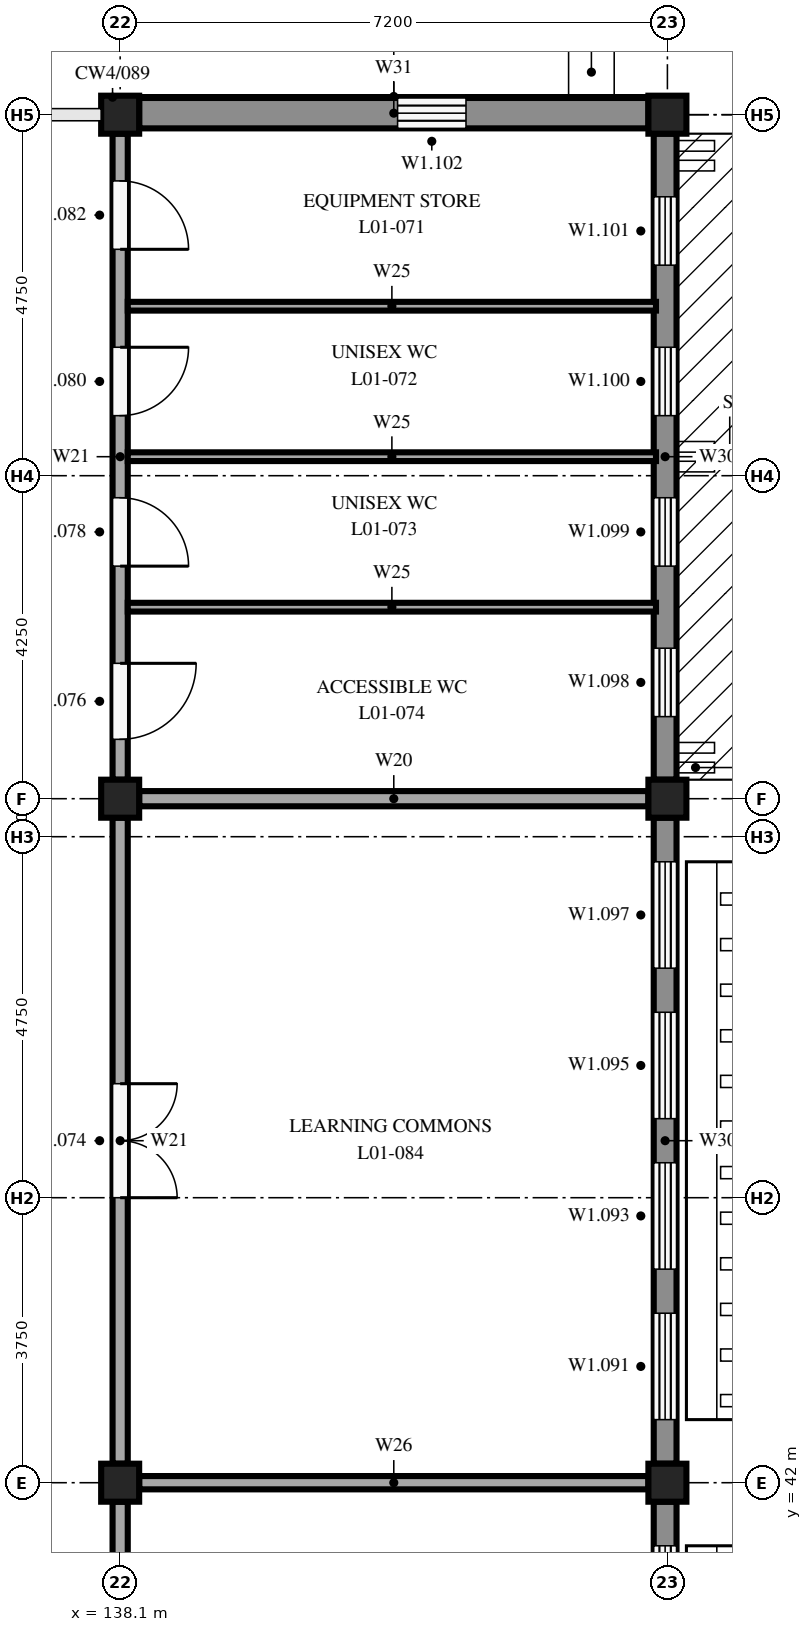
"""IFC4 building model, lengths in metres.
Left out: names, types, materials, properties, quantities, classifications, styles, units other than length and angle.
Written with IfcOpenShell. Run it as: python <this file> out.ifc"""

import sys

from ifc_helpers import new_model, si_unit, direction, frame, frame_2d, origin, origin_2d, place, context, subcontext, project, spatial, rectangle, extrude, element, fill, save


model = new_model("IFC4")
c1 = context("Model", 3, precision=1e-05, world=origin(), true_north=direction((0.0, 1.0)))
c2 = subcontext(c1, "Body", "Model", "MODEL_VIEW")
j1 = project(units=[si_unit("LENGTHUNIT", "METRE"), si_unit("PLANEANGLEUNIT", "RADIAN")], contexts=[c1])
p1 = place(None, origin())
s1 = spatial("IfcSite", under=j1, at=p1, CompositionType="ELEMENT")
p2 = place(p1, origin())
s2 = spatial("IfcBuilding", under=s1, at=p2, CompositionType="ELEMENT")
p3 = place(p2, frame((0.0, 0.0, 4.5)))
s3 = spatial("IfcBuildingStorey", under=s2, at=p3, CompositionType="ELEMENT", Elevation=4.5)
for number, where, z_axis, x_axis in (
    (1, (138.1, 42.0, 0.0), (0.0, 0.0, 1.0), (1.0, 0.0, 0.0)),
    (2, (138.1, 51.0, 0.0), (0.0, 0.0, 1.0), (1.0, 0.0, 0.0)),
    (3, (138.1, 60.0, 0.0), (0.0, 0.0, 1.0), (1.0, 0.0, 0.0)),
    (4, (145.3, 42.0, 0.0), (0.0, 0.0, 1.0), (1.0, 0.0, 0.0)),
    (5, (145.3, 51.0, 0.0), (0.0, 0.0, 1.0), (1.0, 0.0, 0.0)),
    (6, (145.3, 60.0, 0.0), (0.0, 0.0, 1.0), (1.0, 0.0, 0.0)),
):
    element("IfcColumn", number, at=place(p3, frame(where, z_axis=z_axis, x_axis=x_axis)), inside=s3, PredefinedType="COLUMN", context=c2, shape_type="SweptSolid", body=[
        extrude(rectangle(XDim=0.5, YDim=0.5, at=origin_2d()), origin(), (0.0, 0.0, 1.0), 3.35),
    ])
p4 = place(p3, frame((145.27, 41.75, 0.0), z_axis=(0.0, 0.0, 1.0), x_axis=(0.0, -1.0, 0.0)))
e7 = element("IfcWall", 7, at=p4, inside=s3, PredefinedType="STANDARD", context=c2, shape_type="SweptSolid", body=[
    extrude(rectangle(XDim=8.5, YDim=0.3, at=frame_2d((4.25, 0.0))), origin(), (0.0, 0.0, 1.0), 2.85),
])
p5 = place(p4, frame((6.52, 0.0, 0.6)))
e8 = element("IfcOpeningElement", 8, at=p5, cuts=e7, PredefinedType="OPENING", context=c2, shape_type="SweptSolid", body=[
    extrude(rectangle(XDim=1.4, YDim=2.2, at=frame_2d((0.7, 1.1))), frame((0.0, 0.16, 0.0), z_axis=(0.0, -1.0, 0.0), x_axis=(1.0, 0.0, 0.0)), (0.0, 0.0, 1.0), 0.32),
])
p6 = place(p4, frame((4.54, 0.0, 0.6)))
e9 = element("IfcOpeningElement", 9, at=p6, cuts=e7, PredefinedType="OPENING", context=c2, shape_type="SweptSolid", body=[
    extrude(rectangle(XDim=1.4, YDim=2.2, at=frame_2d((0.7, 1.1))), frame((0.0, 0.16, 0.0), z_axis=(0.0, -1.0, 0.0), x_axis=(1.0, 0.0, 0.0)), (0.0, 0.0, 1.0), 0.32),
])
p7 = place(p4, frame((2.56, 0.0, 0.6)))
e10 = element("IfcOpeningElement", 10, at=p7, cuts=e7, PredefinedType="OPENING", context=c2, shape_type="SweptSolid", body=[
    extrude(rectangle(XDim=1.4, YDim=2.2, at=frame_2d((0.7, 1.1))), frame((0.0, 0.16, 0.0), z_axis=(0.0, -1.0, 0.0), x_axis=(1.0, 0.0, 0.0)), (0.0, 0.0, 1.0), 0.32),
])
p8 = place(p4, frame((0.58, 0.0, 0.6)))
e11 = element("IfcOpeningElement", 11, at=p8, cuts=e7, PredefinedType="OPENING", context=c2, shape_type="SweptSolid", body=[
    extrude(rectangle(XDim=1.4, YDim=2.2, at=frame_2d((0.7, 1.1))), frame((0.0, 0.16, 0.0), z_axis=(0.0, -1.0, 0.0), x_axis=(1.0, 0.0, 0.0)), (0.0, 0.0, 1.0), 0.32),
])
p9 = place(p3, frame((145.27, 50.75, 0.0), z_axis=(0.0, 0.0, 1.0), x_axis=(0.0, -1.0, 0.0)))
e12 = element("IfcWall", 12, at=p9, inside=s3, PredefinedType="STANDARD", context=c2, shape_type="SweptSolid", body=[
    extrude(rectangle(XDim=8.5, YDim=0.3, at=frame_2d((4.25, 0.0))), origin(), (0.0, 0.0, 1.0), 2.85),
])
p10 = place(p9, frame((6.52, 0.0, 0.3)))
e13 = element("IfcOpeningElement", 13, at=p10, cuts=e12, PredefinedType="OPENING", context=c2, shape_type="SweptSolid", body=[
    extrude(rectangle(XDim=1.4, YDim=2.5, at=frame_2d((0.7, 1.25))), frame((0.0, 0.16, 0.0), z_axis=(0.0, -1.0, 0.0), x_axis=(1.0, 0.0, 0.0)), (0.0, 0.0, 1.0), 0.32),
])
p11 = place(p9, frame((4.54, 0.0, 0.3)))
e14 = element("IfcOpeningElement", 14, at=p11, cuts=e12, PredefinedType="OPENING", context=c2, shape_type="SweptSolid", body=[
    extrude(rectangle(XDim=1.4, YDim=2.5, at=frame_2d((0.7, 1.25))), frame((0.0, 0.16, 0.0), z_axis=(0.0, -1.0, 0.0), x_axis=(1.0, 0.0, 0.0)), (0.0, 0.0, 1.0), 0.32),
])
p12 = place(p9, frame((2.56, 0.0, 0.3)))
e15 = element("IfcOpeningElement", 15, at=p12, cuts=e12, PredefinedType="OPENING", context=c2, shape_type="SweptSolid", body=[
    extrude(rectangle(XDim=1.4, YDim=2.5, at=frame_2d((0.7, 1.25))), frame((0.0, 0.16, 0.0), z_axis=(0.0, -1.0, 0.0), x_axis=(1.0, 0.0, 0.0)), (0.0, 0.0, 1.0), 0.32),
])
p13 = place(p9, frame((0.58, 0.0, 0.3)))
e16 = element("IfcOpeningElement", 16, at=p13, cuts=e12, PredefinedType="OPENING", context=c2, shape_type="SweptSolid", body=[
    extrude(rectangle(XDim=1.4, YDim=2.5, at=frame_2d((0.7, 1.25))), frame((0.0, 0.16, 0.0), z_axis=(0.0, -1.0, 0.0), x_axis=(1.0, 0.0, 0.0)), (0.0, 0.0, 1.0), 0.32),
])
p14 = place(p3, frame((145.27, 59.75, 0.0), z_axis=(0.0, 0.0, 1.0), x_axis=(0.0, -1.0, 0.0)))
e17 = element("IfcWall", 17, at=p14, inside=s3, PredefinedType="STANDARD", context=c2, shape_type="SweptSolid", body=[
    extrude(rectangle(XDim=8.5, YDim=0.3, at=frame_2d((4.25, 0.0))), origin(), (0.0, 0.0, 1.0), 2.85),
])
p15 = place(p14, frame((6.77, 0.0, 1.6)))
e18 = element("IfcOpeningElement", 18, at=p15, cuts=e17, PredefinedType="OPENING", context=c2, shape_type="SweptSolid", body=[
    extrude(rectangle(XDim=0.9, YDim=1.0, at=frame_2d((0.45, 0.5))), frame((0.0, 0.16, 0.0), z_axis=(0.0, -1.0, 0.0), x_axis=(1.0, 0.0, 0.0)), (0.0, 0.0, 1.0), 0.32),
])
p16 = place(p14, frame((4.79, 0.0, 1.6)))
e19 = element("IfcOpeningElement", 19, at=p16, cuts=e17, PredefinedType="OPENING", context=c2, shape_type="SweptSolid", body=[
    extrude(rectangle(XDim=0.9, YDim=1.0, at=frame_2d((0.45, 0.5))), frame((0.0, 0.16, 0.0), z_axis=(0.0, -1.0, 0.0), x_axis=(1.0, 0.0, 0.0)), (0.0, 0.0, 1.0), 0.32),
])
p17 = place(p14, frame((2.81, 0.0, 1.6)))
e20 = element("IfcOpeningElement", 20, at=p17, cuts=e17, PredefinedType="OPENING", context=c2, shape_type="SweptSolid", body=[
    extrude(rectangle(XDim=0.9, YDim=1.0, at=frame_2d((0.45, 0.5))), frame((0.0, 0.16, 0.0), z_axis=(0.0, -1.0, 0.0), x_axis=(1.0, 0.0, 0.0)), (0.0, 0.0, 1.0), 0.32),
])
p18 = place(p14, frame((0.83, 0.0, 1.6)))
e21 = element("IfcOpeningElement", 21, at=p18, cuts=e17, PredefinedType="OPENING", context=c2, shape_type="SweptSolid", body=[
    extrude(rectangle(XDim=0.9, YDim=1.0, at=frame_2d((0.45, 0.5))), frame((0.0, 0.16, 0.0), z_axis=(0.0, -1.0, 0.0), x_axis=(1.0, 0.0, 0.0)), (0.0, 0.0, 1.0), 0.32),
])
p19 = place(p3, frame((138.35, 60.02, 0.0), z_axis=(0.0, 0.0, 1.0), x_axis=(1.0, 0.0, 0.0)))
e22 = element("IfcWall", 22, at=p19, inside=s3, PredefinedType="STANDARD", context=c2, shape_type="SweptSolid", body=[
    extrude(rectangle(XDim=6.7, YDim=0.4, at=frame_2d((3.35, 0.0))), origin(), (0.0, 0.0, 1.0), 2.9),
])
p20 = place(p19, frame((3.4, 0.0, 1.6)))
e23 = element("IfcOpeningElement", 23, at=p20, cuts=e22, PredefinedType="OPENING", context=c2, shape_type="SweptSolid", body=[
    extrude(rectangle(XDim=0.9, YDim=1.0, at=frame_2d((0.45, 0.5))), frame((0.0, 0.21, 0.0), z_axis=(0.0, -1.0, 0.0), x_axis=(1.0, 0.0, 0.0)), (0.0, 0.0, 1.0), 0.42),
])
p21 = place(p3, frame((138.1, 59.75, 0.0), z_axis=(0.0, 0.0, 1.0), x_axis=(0.0, -1.0, 0.0)))
e24 = element("IfcWall", 24, at=p21, inside=s3, PredefinedType="PARTITIONING", context=c2, shape_type="SweptSolid", body=[
    extrude(rectangle(XDim=8.5, YDim=0.2, at=frame_2d((4.25, 0.0))), origin(), (0.0, 0.0, 1.0), 2.9),
])
p22 = place(p21, frame((6.969, 0.0, 0.0)))
e25 = element("IfcOpeningElement", 25, at=p22, cuts=e24, PredefinedType="OPENING", context=c2, shape_type="SweptSolid", body=[
    extrude(rectangle(XDim=1.0, YDim=2.1, at=frame_2d((0.5, 1.05))), frame((0.0, 0.11, 0.0), z_axis=(0.0, -1.0, 0.0), x_axis=(1.0, 0.0, 0.0)), (0.0, 0.0, 1.0), 0.22),
])
p23 = place(p21, frame((4.79, 0.0, 0.0)))
e26 = element("IfcOpeningElement", 26, at=p23, cuts=e24, PredefinedType="OPENING", context=c2, shape_type="SweptSolid", body=[
    extrude(rectangle(XDim=0.9, YDim=2.1, at=frame_2d((0.45, 1.05))), frame((0.0, 0.11, 0.0), z_axis=(0.0, -1.0, 0.0), x_axis=(1.0, 0.0, 0.0)), (0.0, 0.0, 1.0), 0.22),
])
p24 = place(p21, frame((2.81, 0.0, 0.0)))
e27 = element("IfcOpeningElement", 27, at=p24, cuts=e24, PredefinedType="OPENING", context=c2, shape_type="SweptSolid", body=[
    extrude(rectangle(XDim=0.9, YDim=2.1, at=frame_2d((0.45, 1.05))), frame((0.0, 0.11, 0.0), z_axis=(0.0, -1.0, 0.0), x_axis=(1.0, 0.0, 0.0)), (0.0, 0.0, 1.0), 0.22),
])
p25 = place(p21, frame((0.621, 0.0, 0.0)))
e28 = element("IfcOpeningElement", 28, at=p25, cuts=e24, PredefinedType="OPENING", context=c2, shape_type="SweptSolid", body=[
    extrude(rectangle(XDim=0.9, YDim=2.1, at=frame_2d((0.45, 1.05))), frame((0.0, 0.11, 0.0), z_axis=(0.0, -1.0, 0.0), x_axis=(1.0, 0.0, 0.0)), (0.0, 0.0, 1.0), 0.22),
])
p26 = place(p3, frame((138.35, 51.0, 0.0), z_axis=(0.0, 0.0, 1.0), x_axis=(1.0, 0.0, 0.0)))
e29 = element("IfcWall", 29, at=p26, inside=s3, PredefinedType="PARTITIONING", context=c2, shape_type="SweptSolid", body=[
    extrude(rectangle(XDim=6.7, YDim=0.2, at=frame_2d((3.35, 0.0))), origin(), (0.0, 0.0, 1.0), 2.9),
])
for number, where, z_axis, x_axis in (
    (30, (138.2, 57.48, 0.0), (0.0, 0.0, 1.0), (1.0, 0.0, 0.0)),
    (31, (138.2, 55.5, 0.0), (0.0, 0.0, 1.0), (1.0, 0.0, 0.0)),
    (32, (138.2, 53.52, 0.0), (0.0, 0.0, 1.0), (1.0, 0.0, 0.0)),
):
    element("IfcWall", number, at=place(p3, frame(where, z_axis=z_axis, x_axis=x_axis)), inside=s3, PredefinedType="PARTITIONING", context=c2, shape_type="SweptSolid", body=[
        extrude(rectangle(XDim=6.95, YDim=0.115, at=frame_2d((3.475, 0.0))), origin(), (0.0, 0.0, 1.0), 3.35),
    ])
p27 = place(p3, frame((138.1, 41.75, 0.0), z_axis=(0.0, 0.0, 1.0), x_axis=(0.0, -1.0, 0.0)))
e33 = element("IfcWall", 33, at=p27, inside=s3, PredefinedType="PARTITIONING", context=c2, shape_type="SweptSolid", body=[
    extrude(rectangle(XDim=8.5, YDim=0.2, at=frame_2d((4.25, 0.0))), origin(), (0.0, 0.0, 1.0), 2.9),
])
p28 = place(p27, frame((3.75, 0.0, 0.0)))
e34 = element("IfcOpeningElement", 34, at=p28, cuts=e33, PredefinedType="OPENING", context=c2, shape_type="SweptSolid", body=[
    extrude(rectangle(XDim=1.0, YDim=2.1, at=frame_2d((0.5, 1.05))), frame((0.0, 0.11, 0.0), z_axis=(0.0, -1.0, 0.0), x_axis=(1.0, 0.0, 0.0)), (0.0, 0.0, 1.0), 0.22),
])
p29 = place(p3, frame((138.1, 50.75, 0.0), z_axis=(0.0, 0.0, 1.0), x_axis=(0.0, -1.0, 0.0)))
e35 = element("IfcWall", 35, at=p29, inside=s3, PredefinedType="PARTITIONING", context=c2, shape_type="SweptSolid", body=[
    extrude(rectangle(XDim=8.5, YDim=0.2, at=frame_2d((4.25, 0.0))), origin(), (0.0, 0.0, 1.0), 2.9),
])
p30 = place(p29, frame((3.5, 0.0, 0.0)))
e36 = element("IfcOpeningElement", 36, at=p30, cuts=e35, PredefinedType="OPENING", context=c2, shape_type="SweptSolid", body=[
    extrude(rectangle(XDim=1.5, YDim=2.1, at=frame_2d((0.75, 1.05))), frame((0.0, 0.11, 0.0), z_axis=(0.0, -1.0, 0.0), x_axis=(1.0, 0.0, 0.0)), (0.0, 0.0, 1.0), 0.22),
])
p31 = place(p3, frame((138.35, 42.0, 0.0), z_axis=(0.0, 0.0, 1.0), x_axis=(1.0, 0.0, 0.0)))
e37 = element("IfcWall", 37, at=p31, inside=s3, PredefinedType="PARTITIONING", context=c2, shape_type="SweptSolid", body=[
    extrude(rectangle(XDim=6.7, YDim=0.175, at=frame_2d((3.35, 0.0))), origin(), (0.0, 0.0, 1.0), 2.9),
])
p32 = place(p8, origin())
e38 = element("IfcWindow", 38, at=p32, inside=s3, PartitioningType="DOUBLE_PANEL_VERTICAL", PredefinedType="WINDOW", context=c2, shape_type="SweptSolid", body=[
    extrude(rectangle(XDim=1.4, YDim=2.2, at=frame_2d((0.7, 1.1))), frame((0.0, 0.03, 0.0), z_axis=(0.0, -1.0, 0.0), x_axis=(1.0, 0.0, 0.0)), (0.0, 0.0, 1.0), 0.06),
])
fill(e11, e38)
p33 = place(p10, origin())
e39 = element("IfcWindow", 39, at=p33, inside=s3, PartitioningType="DOUBLE_PANEL_VERTICAL", PredefinedType="WINDOW", context=c2, shape_type="SweptSolid", body=[
    extrude(rectangle(XDim=1.4, YDim=2.5, at=frame_2d((0.7, 1.25))), frame((0.0, 0.03, 0.0), z_axis=(0.0, -1.0, 0.0), x_axis=(1.0, 0.0, 0.0)), (0.0, 0.0, 1.0), 0.06),
])
fill(e13, e39)
p34 = place(p11, origin())
e40 = element("IfcWindow", 40, at=p34, inside=s3, PartitioningType="DOUBLE_PANEL_VERTICAL", PredefinedType="WINDOW", context=c2, shape_type="SweptSolid", body=[
    extrude(rectangle(XDim=1.4, YDim=2.5, at=frame_2d((0.7, 1.25))), frame((0.0, 0.03, 0.0), z_axis=(0.0, -1.0, 0.0), x_axis=(1.0, 0.0, 0.0)), (0.0, 0.0, 1.0), 0.06),
])
fill(e14, e40)
p35 = place(p12, origin())
e41 = element("IfcWindow", 41, at=p35, inside=s3, PartitioningType="DOUBLE_PANEL_VERTICAL", PredefinedType="WINDOW", context=c2, shape_type="SweptSolid", body=[
    extrude(rectangle(XDim=1.4, YDim=2.5, at=frame_2d((0.7, 1.25))), frame((0.0, 0.03, 0.0), z_axis=(0.0, -1.0, 0.0), x_axis=(1.0, 0.0, 0.0)), (0.0, 0.0, 1.0), 0.06),
])
fill(e15, e41)
p36 = place(p13, origin())
e42 = element("IfcWindow", 42, at=p36, inside=s3, PartitioningType="DOUBLE_PANEL_VERTICAL", PredefinedType="WINDOW", context=c2, shape_type="SweptSolid", body=[
    extrude(rectangle(XDim=1.4, YDim=2.5, at=frame_2d((0.7, 1.25))), frame((0.0, 0.03, 0.0), z_axis=(0.0, -1.0, 0.0), x_axis=(1.0, 0.0, 0.0)), (0.0, 0.0, 1.0), 0.06),
])
fill(e16, e42)
p37 = place(p15, origin())
e43 = element("IfcWindow", 43, at=p37, inside=s3, PartitioningType="SINGLE_PANEL", PredefinedType="WINDOW", context=c2, shape_type="SweptSolid", body=[
    extrude(rectangle(XDim=0.9, YDim=1.0, at=frame_2d((0.45, 0.5))), frame((0.0, 0.03, 0.0), z_axis=(0.0, -1.0, 0.0), x_axis=(1.0, 0.0, 0.0)), (0.0, 0.0, 1.0), 0.06),
])
fill(e18, e43)
p38 = place(p16, origin())
e44 = element("IfcWindow", 44, at=p38, inside=s3, PartitioningType="SINGLE_PANEL", PredefinedType="WINDOW", context=c2, shape_type="SweptSolid", body=[
    extrude(rectangle(XDim=0.9, YDim=1.0, at=frame_2d((0.45, 0.5))), frame((0.0, 0.03, 0.0), z_axis=(0.0, -1.0, 0.0), x_axis=(1.0, 0.0, 0.0)), (0.0, 0.0, 1.0), 0.06),
])
fill(e19, e44)
p39 = place(p17, origin())
e45 = element("IfcWindow", 45, at=p39, inside=s3, PartitioningType="SINGLE_PANEL", PredefinedType="WINDOW", context=c2, shape_type="SweptSolid", body=[
    extrude(rectangle(XDim=0.9, YDim=1.0, at=frame_2d((0.45, 0.5))), frame((0.0, 0.03, 0.0), z_axis=(0.0, -1.0, 0.0), x_axis=(1.0, 0.0, 0.0)), (0.0, 0.0, 1.0), 0.06),
])
fill(e20, e45)
p40 = place(p18, origin())
e46 = element("IfcWindow", 46, at=p40, inside=s3, PartitioningType="SINGLE_PANEL", PredefinedType="WINDOW", context=c2, shape_type="SweptSolid", body=[
    extrude(rectangle(XDim=0.9, YDim=1.0, at=frame_2d((0.45, 0.5))), frame((0.0, 0.03, 0.0), z_axis=(0.0, -1.0, 0.0), x_axis=(1.0, 0.0, 0.0)), (0.0, 0.0, 1.0), 0.06),
])
fill(e21, e46)
p41 = place(p20, origin())
e47 = element("IfcWindow", 47, at=p41, inside=s3, PartitioningType="SINGLE_PANEL", PredefinedType="WINDOW", context=c2, shape_type="SweptSolid", body=[
    extrude(rectangle(XDim=0.9, YDim=1.0, at=frame_2d((0.45, 0.5))), frame((0.0, 0.03, 0.0), z_axis=(0.0, -1.0, 0.0), x_axis=(1.0, 0.0, 0.0)), (0.0, 0.0, 1.0), 0.06),
])
fill(e23, e47)
p42 = place(p22, origin())
e48 = element("IfcDoor", 48, at=p42, inside=s3, OperationType="SINGLE_SWING_LEFT", PredefinedType="DOOR", context=c2, shape_type="SweptSolid", body=[
    extrude(rectangle(XDim=1.0, YDim=2.1, at=frame_2d((0.5, 1.05))), frame((0.0, 0.025, 0.0), z_axis=(0.0, -1.0, 0.0), x_axis=(1.0, 0.0, 0.0)), (0.0, 0.0, 1.0), 0.05),
])
fill(e25, e48)
p43 = place(p23, origin())
e49 = element("IfcDoor", 49, at=p43, inside=s3, OperationType="SINGLE_SWING_RIGHT", PredefinedType="DOOR", context=c2, shape_type="SweptSolid", body=[
    extrude(rectangle(XDim=0.9, YDim=2.1, at=frame_2d((0.45, 1.05))), frame((0.0, 0.025, 0.0), z_axis=(0.0, -1.0, 0.0), x_axis=(1.0, 0.0, 0.0)), (0.0, 0.0, 1.0), 0.05),
])
fill(e26, e49)
p44 = place(p24, origin())
e50 = element("IfcDoor", 50, at=p44, inside=s3, OperationType="SINGLE_SWING_LEFT", PredefinedType="DOOR", context=c2, shape_type="SweptSolid", body=[
    extrude(rectangle(XDim=0.9, YDim=2.1, at=frame_2d((0.45, 1.05))), frame((0.0, 0.025, 0.0), z_axis=(0.0, -1.0, 0.0), x_axis=(1.0, 0.0, 0.0)), (0.0, 0.0, 1.0), 0.05),
])
fill(e27, e50)
p45 = place(p25, origin())
e51 = element("IfcDoor", 51, at=p45, inside=s3, OperationType="SINGLE_SWING_RIGHT", PredefinedType="DOOR", context=c2, shape_type="SweptSolid", body=[
    extrude(rectangle(XDim=0.9, YDim=2.1, at=frame_2d((0.45, 1.05))), frame((0.0, 0.025, 0.0), z_axis=(0.0, -1.0, 0.0), x_axis=(1.0, 0.0, 0.0)), (0.0, 0.0, 1.0), 0.05),
])
fill(e28, e51)
p46 = place(p30, origin())
e52 = element("IfcDoor", 52, at=p46, inside=s3, OperationType="DOUBLE_DOOR_SINGLE_SWING", PredefinedType="DOOR", context=c2, shape_type="SweptSolid", body=[
    extrude(rectangle(XDim=1.5, YDim=2.1, at=frame_2d((0.75, 1.05))), frame((0.0, 0.025, 0.0), z_axis=(0.0, -1.0, 0.0), x_axis=(1.0, 0.0, 0.0)), (0.0, 0.0, 1.0), 0.05),
])
fill(e36, e52)
save(model, sys.argv[1])
